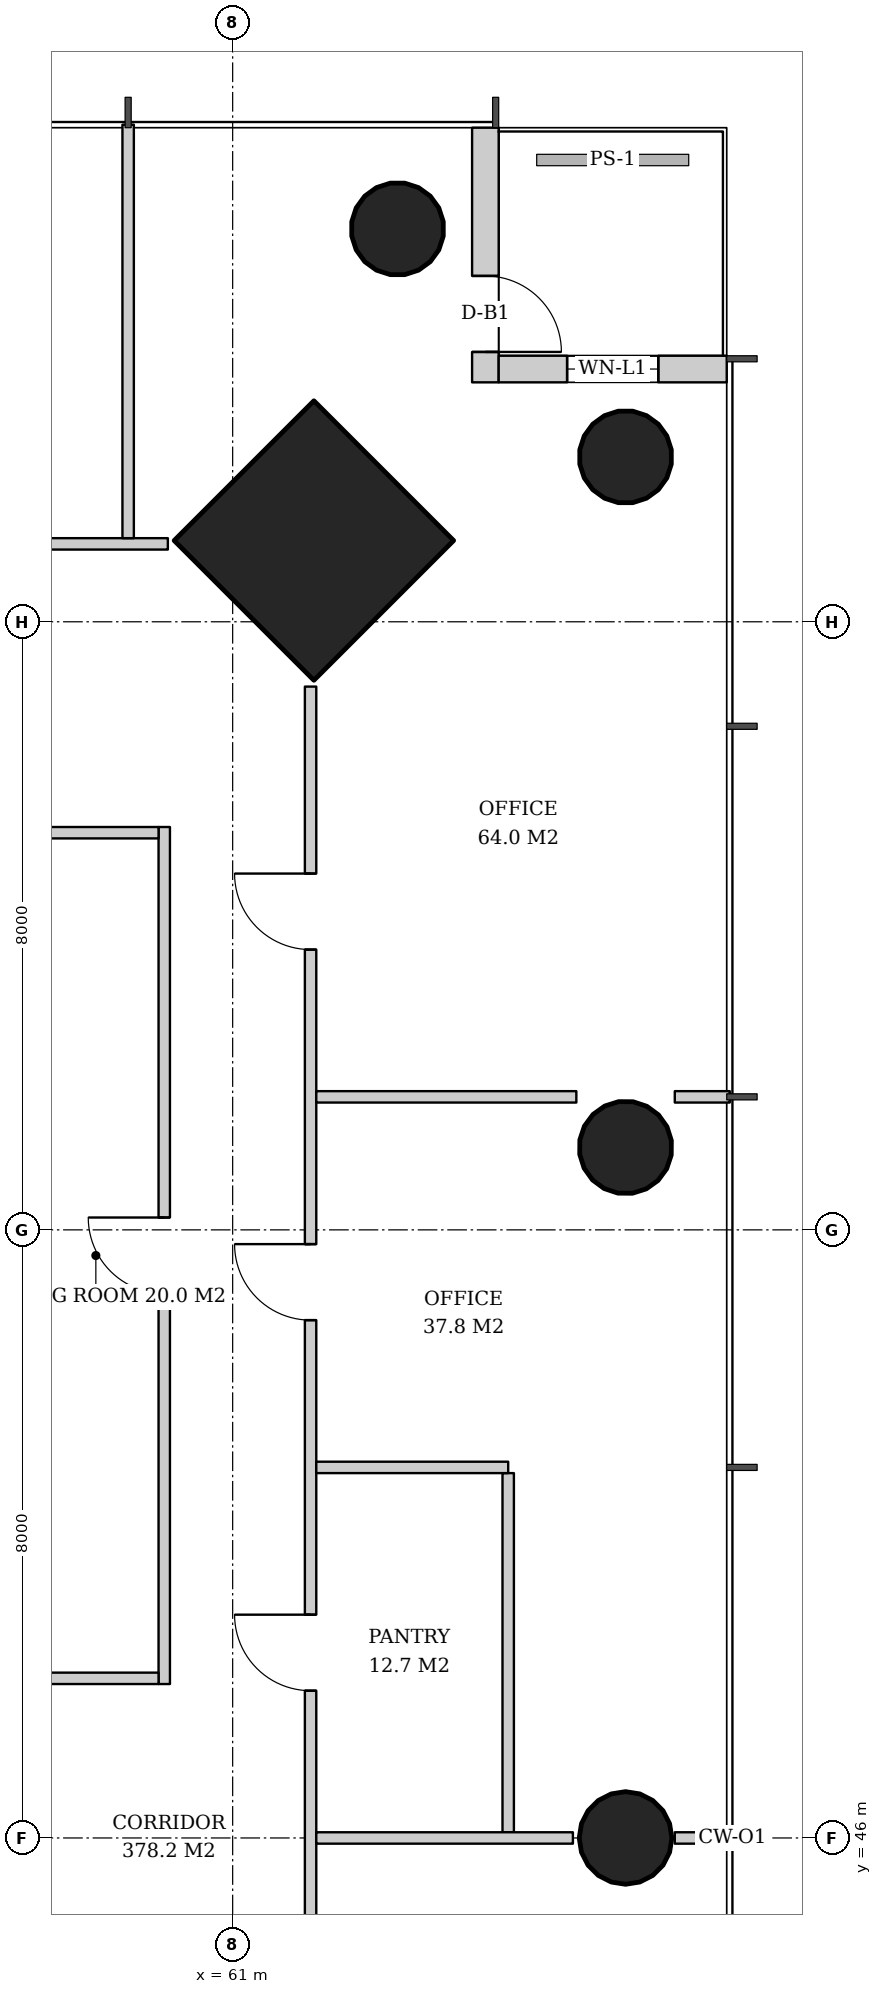
"""IFC4 building model, lengths in metres.
Left out: names, types, materials, properties, quantities, classifications, styles, units other than length and angle.
Written with IfcOpenShell. Run it as: python <this file> out.ifc"""

import sys

from ifc_helpers import new_model, si_unit, direction, frame, frame_2d, origin, origin_2d, place, context, subcontext, project, spatial, rectangle, hollow_circle, extrude, element, fill, save


model = new_model("IFC4")
c1 = context("Model", 3, precision=1e-05, world=origin(), true_north=direction((0.0, 1.0)))
c2 = subcontext(c1, "Body", "Model", "MODEL_VIEW")
j1 = project(units=[si_unit("LENGTHUNIT", "METRE"), si_unit("PLANEANGLEUNIT", "RADIAN")], contexts=[c1])
p1 = place(None, origin())
s1 = spatial("IfcSite", under=j1, at=p1, CompositionType="ELEMENT")
p2 = place(p1, origin())
s2 = spatial("IfcBuilding", under=s1, at=p2, CompositionType="ELEMENT")
p3 = place(p2, frame((0.0, 0.0, 108.4)))
s3 = spatial("IfcBuildingStorey", under=s2, at=p3, CompositionType="ELEMENT", Elevation=108.4)
p4 = place(p3, frame((62.107, 63.107, 0.0), z_axis=(-0.031962158256, -0.031962158256, 0.998977898093), x_axis=(0.707106781187, -0.707106781187, 0.0)))
e1 = element("IfcColumn", 1, at=p4, inside=s3, PredefinedType="COLUMN", context=c2, shape_type="SweptSolid", body=[
    extrude(rectangle(XDim=2.6, YDim=2.6, at=origin_2d()), origin(), (0.0, 0.0, 1.0), 3.804),
])
p5 = place(p3, frame((66.207, 64.207, 0.0), z_axis=(-0.031898107953, -0.031898107953, 0.998981992539), x_axis=(0.707106781187, -0.707106781187, 0.0)))
e2 = element("IfcColumn", 2, at=p5, inside=s3, PredefinedType="COLUMN", context=c2, shape_type="SweptSolid", body=[
    extrude(hollow_circle(Radius=0.61, WallThickness=0.04, at=origin_2d()), origin(), (0.0, 0.0, 1.0), 3.804),
])
p6 = place(p3, frame((66.207, 46.0, 0.0), z_axis=(-0.031914348339, 0.0, 0.999490607445), x_axis=(0.0, -1.0, 0.0)))
e3 = element("IfcColumn", 3, at=p6, inside=s3, PredefinedType="COLUMN", context=c2, shape_type="SweptSolid", body=[
    extrude(hollow_circle(Radius=0.61, WallThickness=0.04, at=origin_2d()), origin(), (0.0, 0.0, 1.0), 3.802),
])
p7 = place(p3, frame((66.207, 55.104, 0.0), z_axis=(-0.031910302246, -0.015923048203, 0.999363892257), x_axis=(0.446493300058, -0.894786976326, 0.0)))
e4 = element("IfcColumn", 4, at=p7, inside=s3, PredefinedType="COLUMN", context=c2, shape_type="SweptSolid", body=[
    extrude(hollow_circle(Radius=0.61, WallThickness=0.04, at=origin_2d()), origin(), (0.0, 0.0, 1.0), 3.802),
])
p8 = place(p3, frame((63.207, 67.207, 0.0), z_axis=(-0.031898107953, -0.031898107953, 0.998981992539), x_axis=(0.707106781187, -0.707106781187, 0.0)))
e5 = element("IfcColumn", 5, at=p8, inside=s3, PredefinedType="COLUMN", context=c2, shape_type="SweptSolid", body=[
    extrude(hollow_circle(Radius=0.61, WallThickness=0.04, at=origin_2d()), origin(), (0.0, 0.0, 1.0), 3.804),
])
p9 = place(p3, frame((64.325, 68.5, 0.0), z_axis=(0.0, 0.0, 1.0), x_axis=(0.0, -1.0, 0.0)))
e6 = element("IfcWall", 6, at=p9, inside=s3, PredefinedType="SOLIDWALL", context=c2, shape_type="SweptSolid", body=[
    extrude(rectangle(XDim=3.35, YDim=0.35, at=frame_2d((1.675, 0.0))), origin(), (0.0, 0.0, 1.0), 3.62),
])
p10 = place(p9, frame((1.95, 0.0, 0.0)))
e7 = element("IfcOpeningElement", 7, at=p10, cuts=e6, PredefinedType="OPENING", context=c2, shape_type="SweptSolid", body=[
    extrude(rectangle(XDim=1.0, YDim=2.4, at=frame_2d((0.5, 1.2))), frame((0.0, 0.185, 0.0), z_axis=(0.0, -1.0, 0.0), x_axis=(1.0, 0.0, 0.0)), (0.0, 0.0, 1.0), 0.37),
])
p11 = place(p3, frame((64.5, 65.325, 0.0), z_axis=(0.0, 0.0, 1.0), x_axis=(1.0, 0.0, 0.0)))
e8 = element("IfcWall", 8, at=p11, inside=s3, PredefinedType="SOLIDWALL", context=c2, shape_type="SweptSolid", body=[
    extrude(rectangle(XDim=3.0, YDim=0.35, at=frame_2d((1.5, 0.0))), origin(), (0.0, 0.0, 1.0), 3.62),
])
p12 = place(p11, frame((0.9, 0.0, 0.6)))
e9 = element("IfcOpeningElement", 9, at=p12, cuts=e8, PredefinedType="OPENING", context=c2, shape_type="SweptSolid", body=[
    extrude(rectangle(XDim=1.2, YDim=2.55, at=frame_2d((0.6, 1.275))), frame((0.0, 0.185, 0.0), z_axis=(0.0, -1.0, 0.0), x_axis=(1.0, 0.0, 0.0)), (0.0, 0.0, 1.0), 0.37),
])
p13 = place(p3, frame((60.1, 48.025, 0.0), z_axis=(0.0, 0.0, 1.0), x_axis=(0.0, 1.0, 0.0)))
e10 = element("IfcWall", 10, at=p13, inside=s3, PredefinedType="PARTITIONING", context=c2, shape_type="SweptSolid", body=[
    extrude(rectangle(XDim=11.275, YDim=0.15, at=frame_2d((5.638, 0.0))), origin(), (0.0, 0.0, 1.0), 2.806),
])
p14 = place(p13, frame((5.137, 0.0, 0.0)))
e11 = element("IfcOpeningElement", 11, at=p14, cuts=e10, PredefinedType="OPENING", context=c2, shape_type="SweptSolid", body=[
    extrude(rectangle(XDim=1.0, YDim=2.1, at=frame_2d((0.5, 1.05))), frame((0.0, 0.085, 0.0), z_axis=(0.0, -1.0, 0.0), x_axis=(1.0, 0.0, 0.0)), (0.0, 0.0, 1.0), 0.17),
])
for number, where, z_axis, x_axis in (
    (12, (58.3, 48.1, 0.0), (0.0, 0.0, 1.0), (1.0, 0.0, 0.0)),
    (13, (58.3, 59.225, 0.0), (0.0, 0.0, 1.0), (1.0, 0.0, 0.0)),
):
    element("IfcWall", number, at=place(p3, frame(where, z_axis=z_axis, x_axis=x_axis)), inside=s3, PredefinedType="PARTITIONING", context=c2, shape_type="SweptSolid", body=[
        extrude(rectangle(XDim=1.725, YDim=0.15, at=frame_2d((0.862, 0.0))), origin(), (0.0, 0.0, 1.0), 3.62),
    ])
p15 = place(p3, frame((64.625, 46.075, 0.0), z_axis=(0.0, 0.0, 1.0), x_axis=(0.0, 1.0, 0.0)))
e14 = element("IfcWall", 14, at=p15, inside=s3, PredefinedType="PARTITIONING", context=c2, shape_type="SweptSolid", body=[
    extrude(rectangle(XDim=4.725, YDim=0.15, at=frame_2d((2.363, 0.0))), origin(), (0.0, 0.0, 1.0), 2.858),
])
p16 = place(p3, frame((62.025, 30.853, 0.0), z_axis=(0.0, 0.0, 1.0), x_axis=(0.0, 1.0, 0.0)))
e15 = element("IfcWall", 15, at=p16, inside=s3, PredefinedType="PARTITIONING", context=c2, shape_type="SweptSolid", body=[
    extrude(rectangle(XDim=30.294, YDim=0.15, at=frame_2d((15.147, 0.0))), origin(), (0.0, 0.0, 1.0), 2.72),
])
p17 = place(p16, frame((2.46, 0.0, 0.0)))
e16 = element("IfcOpeningElement", 16, at=p17, cuts=e15, PredefinedType="OPENING", context=c2, shape_type="SweptSolid", body=[
    extrude(rectangle(XDim=1.0, YDim=2.1, at=frame_2d((0.5, 1.05))), frame((0.0, 0.085, 0.0), z_axis=(0.0, -1.0, 0.0), x_axis=(1.0, 0.0, 0.0)), (0.0, 0.0, 1.0), 0.17),
])
p18 = place(p16, frame((7.335, 0.0, 0.0)))
e17 = element("IfcOpeningElement", 17, at=p18, cuts=e15, PredefinedType="OPENING", context=c2, shape_type="SweptSolid", body=[
    extrude(rectangle(XDim=1.0, YDim=2.1, at=frame_2d((0.5, 1.05))), frame((0.0, 0.085, 0.0), z_axis=(0.0, -1.0, 0.0), x_axis=(1.0, 0.0, 0.0)), (0.0, 0.0, 1.0), 0.17),
])
p19 = place(p16, frame((12.21, 0.0, 0.0)))
e18 = element("IfcOpeningElement", 18, at=p19, cuts=e15, PredefinedType="OPENING", context=c2, shape_type="SweptSolid", body=[
    extrude(rectangle(XDim=1.0, YDim=2.1, at=frame_2d((0.5, 1.05))), frame((0.0, 0.085, 0.0), z_axis=(0.0, -1.0, 0.0), x_axis=(1.0, 0.0, 0.0)), (0.0, 0.0, 1.0), 0.17),
])
p20 = place(p16, frame((17.085, 0.0, 0.0)))
e19 = element("IfcOpeningElement", 19, at=p20, cuts=e15, PredefinedType="OPENING", context=c2, shape_type="SweptSolid", body=[
    extrude(rectangle(XDim=1.0, YDim=2.1, at=frame_2d((0.5, 1.05))), frame((0.0, 0.085, 0.0), z_axis=(0.0, -1.0, 0.0), x_axis=(1.0, 0.0, 0.0)), (0.0, 0.0, 1.0), 0.17),
])
p21 = place(p16, frame((21.96, 0.0, 0.0)))
e20 = element("IfcOpeningElement", 20, at=p21, cuts=e15, PredefinedType="OPENING", context=c2, shape_type="SweptSolid", body=[
    extrude(rectangle(XDim=1.0, YDim=2.1, at=frame_2d((0.5, 1.05))), frame((0.0, 0.085, 0.0), z_axis=(0.0, -1.0, 0.0), x_axis=(1.0, 0.0, 0.0)), (0.0, 0.0, 1.0), 0.17),
])
p22 = place(p16, frame((26.835, 0.0, 0.0)))
e21 = element("IfcOpeningElement", 21, at=p22, cuts=e15, PredefinedType="OPENING", context=c2, shape_type="SweptSolid", body=[
    extrude(rectangle(XDim=1.0, YDim=2.1, at=frame_2d((0.5, 1.05))), frame((0.0, 0.085, 0.0), z_axis=(0.0, -1.0, 0.0), x_axis=(1.0, 0.0, 0.0)), (0.0, 0.0, 1.0), 0.17),
])
p23 = place(p3, frame((62.1, 46.0, 0.0), z_axis=(0.0, 0.0, 1.0), x_axis=(1.0, 0.0, 0.0)))
e22 = element("IfcWall", 22, at=p23, inside=s3, PredefinedType="PARTITIONING", context=c2, shape_type="SweptSolid", body=[
    extrude(rectangle(XDim=3.376, YDim=0.15, at=frame_2d((1.688, 0.0))), origin(), (0.0, 0.0, 1.0), 2.858),
])
p24 = place(p3, frame((66.817, 46.0, 0.0), z_axis=(0.0, 0.0, 1.0), x_axis=(1.0, 0.0, 0.0)))
e23 = element("IfcWall", 23, at=p24, inside=s3, PredefinedType="PARTITIONING", context=c2, shape_type="SweptSolid", body=[
    extrude(rectangle(XDim=0.723, YDim=0.15, at=frame_2d((0.362, 0.0))), origin(), (0.0, 0.0, 1.0), 3.62),
])
p25 = place(p3, frame((62.1, 50.875, 0.0), z_axis=(0.0, 0.0, 1.0), x_axis=(1.0, 0.0, 0.0)))
e24 = element("IfcWall", 24, at=p25, inside=s3, PredefinedType="PARTITIONING", context=c2, shape_type="SweptSolid", body=[
    extrude(rectangle(XDim=2.525, YDim=0.15, at=frame_2d((1.262, 0.0))), origin(), (0.0, 0.0, 1.0), 3.62),
])
p26 = place(p3, frame((62.1, 55.75, 0.0), z_axis=(0.0, 0.0, 1.0), x_axis=(1.0, 0.0, 0.0)))
e25 = element("IfcWall", 25, at=p26, inside=s3, PredefinedType="PARTITIONING", context=c2, shape_type="SweptSolid", body=[
    extrude(rectangle(XDim=3.421, YDim=0.15, at=frame_2d((1.711, 0.0))), origin(), (0.0, 0.0, 1.0), 3.62),
])
p27 = place(p3, frame((66.817, 55.75, 0.0), z_axis=(0.0, 0.0, 1.0), x_axis=(1.0, 0.0, 0.0)))
e26 = element("IfcWall", 26, at=p27, inside=s3, PredefinedType="PARTITIONING", context=c2, shape_type="SweptSolid", body=[
    extrude(rectangle(XDim=0.723, YDim=0.15, at=frame_2d((0.362, 0.0))), origin(), (0.0, 0.0, 1.0), 3.62),
])
p28 = place(p3, frame((60.147, 63.025, 0.0), z_axis=(0.0, 0.0, 1.0), x_axis=(-1.0, 0.0, 0.0)))
e27 = element("IfcWall", 27, at=p28, inside=s3, PredefinedType="PARTITIONING", context=c2, shape_type="SweptSolid", body=[
    extrude(rectangle(XDim=30.294, YDim=0.15, at=frame_2d((15.147, 0.0))), origin(), (0.0, 0.0, 1.0), 2.72),
])
p29 = place(p28, frame((2.06, 0.0, 0.0)))
e28 = element("IfcOpeningElement", 28, at=p29, cuts=e27, PredefinedType="OPENING", context=c2, shape_type="SweptSolid", body=[
    extrude(rectangle(XDim=1.8, YDim=2.4, at=frame_2d((0.9, 1.2))), frame((0.0, 0.085, 0.0), z_axis=(0.0, -1.0, 0.0), x_axis=(1.0, 0.0, 0.0)), (0.0, 0.0, 1.0), 0.17),
])
p30 = place(p28, frame((6.935, 0.0, 0.0)))
e29 = element("IfcOpeningElement", 29, at=p30, cuts=e27, PredefinedType="OPENING", context=c2, shape_type="SweptSolid", body=[
    extrude(rectangle(XDim=1.8, YDim=2.4, at=frame_2d((0.9, 1.2))), frame((0.0, 0.085, 0.0), z_axis=(0.0, -1.0, 0.0), x_axis=(1.0, 0.0, 0.0)), (0.0, 0.0, 1.0), 0.17),
])
p31 = place(p3, frame((59.625, 63.1, 0.0), z_axis=(0.0, 0.0, 1.0), x_axis=(0.0, 1.0, 0.0)))
e30 = element("IfcWall", 30, at=p31, inside=s3, PredefinedType="PARTITIONING", context=c2, shape_type="SweptSolid", body=[
    extrude(rectangle(XDim=5.44, YDim=0.15, at=frame_2d((2.72, 0.0))), origin(), (0.0, 0.0, 1.0), 2.82),
])
p32 = place(p10, origin())
e31 = element("IfcDoor", 31, at=p32, inside=s3, OperationType="SINGLE_SWING_RIGHT", PredefinedType="DOOR", context=c2, shape_type="SweptSolid", body=[
    extrude(rectangle(XDim=1.0, YDim=2.4, at=frame_2d((0.5, 1.2))), frame((0.0, 0.025, 0.0), z_axis=(0.0, -1.0, 0.0), x_axis=(1.0, 0.0, 0.0)), (0.0, 0.0, 1.0), 0.05),
])
fill(e7, e31)
p33 = place(p12, origin())
e32 = element("IfcWindow", 32, at=p33, inside=s3, PartitioningType="SINGLE_PANEL", PredefinedType="WINDOW", context=c2, shape_type="SweptSolid", body=[
    extrude(rectangle(XDim=1.2, YDim=2.55, at=frame_2d((0.6, 1.275))), frame((0.0, 0.03, 0.0), z_axis=(0.0, -1.0, 0.0), x_axis=(1.0, 0.0, 0.0)), (0.0, 0.0, 1.0), 0.06),
])
fill(e9, e32)
p34 = place(p14, origin())
e33 = element("IfcDoor", 33, at=p34, inside=s3, OperationType="SINGLE_SWING_RIGHT", PredefinedType="DOOR", context=c2, shape_type="SweptSolid", body=[
    extrude(rectangle(XDim=1.0, YDim=2.1, at=frame_2d((0.5, 1.05))), frame((0.0, 0.025, 0.0), z_axis=(0.0, -1.0, 0.0), x_axis=(1.0, 0.0, 0.0)), (0.0, 0.0, 1.0), 0.05),
])
fill(e11, e33)
p35 = place(p20, origin())
e34 = element("IfcDoor", 34, at=p35, inside=s3, OperationType="SINGLE_SWING_RIGHT", PredefinedType="DOOR", context=c2, shape_type="SweptSolid", body=[
    extrude(rectangle(XDim=1.0, YDim=2.1, at=frame_2d((0.5, 1.05))), frame((0.0, 0.025, 0.0), z_axis=(0.0, -1.0, 0.0), x_axis=(1.0, 0.0, 0.0)), (0.0, 0.0, 1.0), 0.05),
])
fill(e19, e34)
p36 = place(p21, origin())
e35 = element("IfcDoor", 35, at=p36, inside=s3, OperationType="SINGLE_SWING_RIGHT", PredefinedType="DOOR", context=c2, shape_type="SweptSolid", body=[
    extrude(rectangle(XDim=1.0, YDim=2.1, at=frame_2d((0.5, 1.05))), frame((0.0, 0.025, 0.0), z_axis=(0.0, -1.0, 0.0), x_axis=(1.0, 0.0, 0.0)), (0.0, 0.0, 1.0), 0.05),
])
fill(e20, e35)
p37 = place(p22, origin())
e36 = element("IfcDoor", 36, at=p37, inside=s3, OperationType="SINGLE_SWING_RIGHT", PredefinedType="DOOR", context=c2, shape_type="SweptSolid", body=[
    extrude(rectangle(XDim=1.0, YDim=2.1, at=frame_2d((0.5, 1.05))), frame((0.0, 0.025, 0.0), z_axis=(0.0, -1.0, 0.0), x_axis=(1.0, 0.0, 0.0)), (0.0, 0.0, 1.0), 0.05),
])
fill(e21, e36)
save(model, sys.argv[1])
